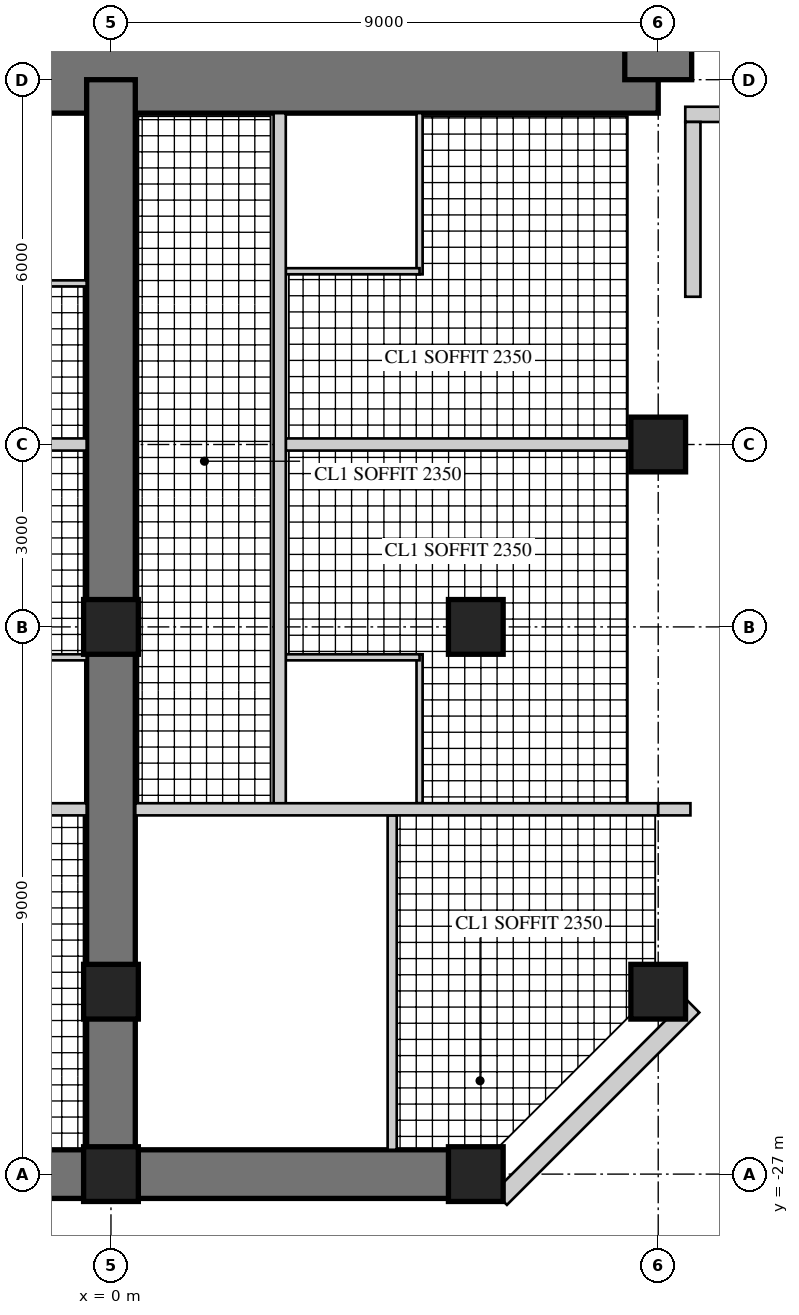
"""IFC4 building model, lengths in metres.
Left out: names, types, materials, properties, quantities, classifications, styles, units other than length and angle.
Written with IfcOpenShell. Run it as: python <this file> out.ifc"""

import sys

from ifc_helpers import new_model, si_unit, direction, frame, frame_2d, origin, origin_2d, place, context, subcontext, project, spatial, rectangle, hollow_rectangle, extrude, element, fill, save


model = new_model("IFC4")
c1 = context("Model", 3, precision=1e-05, world=origin(), true_north=direction((0.0, 1.0)))
c2 = subcontext(c1, "Body", "Model", "MODEL_VIEW")
j1 = project(units=[si_unit("LENGTHUNIT", "METRE"), si_unit("PLANEANGLEUNIT", "RADIAN")], contexts=[c1])
p1 = place(None, origin())
s1 = spatial("IfcSite", under=j1, at=p1, CompositionType="ELEMENT")
p2 = place(p1, origin())
s2 = spatial("IfcBuilding", under=s1, at=p2, CompositionType="ELEMENT")
p3 = place(p2, frame((0.0, 0.0, 172.9)))
s3 = spatial("IfcBuildingStorey", under=s2, at=p3, CompositionType="ELEMENT", Elevation=172.9)
p4 = place(p3, frame((-9.0, -9.0, 0.0), z_axis=(0.0, 0.0, 1.0), x_axis=(1.0, 0.0, 0.0)))
e1 = element("IfcWall", 1, at=p4, inside=s3, PredefinedType="SHEAR", context=c2, shape_type="SweptSolid", body=[
    extrude(rectangle(XDim=18.0, YDim=1.1, at=frame_2d((9.0, 0.0))), origin(), (0.0, 0.0, 1.0), 3.4),
])
p5 = place(p4, frame((9.8, 0.0, 0.0)))
e2 = element("IfcOpeningElement", 2, at=p5, cuts=e1, PredefinedType="OPENING", context=c2, shape_type="SweptSolid", body=[
    extrude(rectangle(XDim=1.0, YDim=2.4, at=frame_2d((0.5, 1.2))), frame((0.0, 0.56, 0.0), z_axis=(0.0, -1.0, 0.0), x_axis=(1.0, 0.0, 0.0)), (0.0, 0.0, 1.0), 1.12),
])
p6 = place(p3, frame((9.0, -9.0, 0.0), z_axis=(0.0, 0.0, 1.0), x_axis=(0.0, 1.0, 0.0)))
e3 = element("IfcWall", 3, at=p6, inside=s3, PredefinedType="SHEAR", context=c2, shape_type="SweptSolid", body=[
    extrude(rectangle(XDim=18.0, YDim=1.1, at=frame_2d((9.0, 0.0))), origin(), (0.0, 0.0, 1.0), 3.4),
])
p7 = place(p6, frame((9.8, 0.0, 0.0)))
e4 = element("IfcOpeningElement", 4, at=p7, cuts=e3, PredefinedType="OPENING", context=c2, shape_type="SweptSolid", body=[
    extrude(rectangle(XDim=1.0, YDim=2.4, at=frame_2d((0.5, 1.2))), frame((0.0, 0.56, 0.0), z_axis=(0.0, -1.0, 0.0), x_axis=(1.0, 0.0, 0.0)), (0.0, 0.0, 1.0), 1.12),
])
p8 = place(p3, frame((0.0, -9.0, 0.0), z_axis=(0.0, 0.0, 1.0), x_axis=(0.0, -1.0, 0.0)))
e5 = element("IfcWall", 5, at=p8, inside=s3, PredefinedType="SHEAR", context=c2, shape_type="SweptSolid", body=[
    extrude(rectangle(XDim=18.0, YDim=0.8, at=frame_2d((9.0, 0.0))), origin(), (0.0, 0.0, 1.0), 3.4),
])
p9 = place(p8, frame((3.95, 0.0, 0.0)))
e6 = element("IfcOpeningElement", 6, at=p9, cuts=e5, PredefinedType="OPENING", context=c2, shape_type="SweptSolid", body=[
    extrude(rectangle(XDim=1.0, YDim=2.15, at=frame_2d((0.5, 1.075))), frame((0.0, 0.41, 0.0), z_axis=(0.0, -1.0, 0.0), x_axis=(1.0, 0.0, 0.0)), (0.0, 0.0, 1.0), 0.82),
])
p10 = place(p8, frame((6.6, 0.0, 0.0)))
e7 = element("IfcOpeningElement", 7, at=p10, cuts=e5, PredefinedType="OPENING", context=c2, shape_type="SweptSolid", body=[
    extrude(rectangle(XDim=1.0, YDim=2.15, at=frame_2d((0.5, 1.075))), frame((0.0, 0.41, 0.0), z_axis=(0.0, -1.0, 0.0), x_axis=(1.0, 0.0, 0.0)), (0.0, 0.0, 1.0), 0.82),
])
p11 = place(p8, frame((13.25, 0.0, 0.0)))
e8 = element("IfcOpeningElement", 8, at=p11, cuts=e5, PredefinedType="OPENING", context=c2, shape_type="SweptSolid", body=[
    extrude(rectangle(XDim=1.0, YDim=2.2, at=frame_2d((0.5, 1.1))), frame((0.0, 0.41, 0.0), z_axis=(0.0, -1.0, 0.0), x_axis=(1.0, 0.0, 0.0)), (0.0, 0.0, 1.0), 0.82),
])
p12 = place(p3, frame((-6.0, -27.0, 0.0), z_axis=(0.0, 0.0, 1.0), x_axis=(1.0, 0.0, 0.0)))
e9 = element("IfcWall", 9, at=p12, inside=s3, PredefinedType="SHEAR", context=c2, shape_type="SweptSolid", body=[
    extrude(rectangle(XDim=12.0, YDim=0.8, at=frame_2d((6.0, 0.0))), origin(), (0.0, 0.0, 1.0), 3.4),
])
p13 = place(p12, frame((1.625, 0.0, 0.6)))
e10 = element("IfcOpeningElement", 10, at=p13, cuts=e9, PredefinedType="OPENING", context=c2, shape_type="SweptSolid", body=[
    extrude(rectangle(XDim=3.0, YDim=2.4, at=frame_2d((1.5, 1.2))), frame((0.0, 0.41, 0.0), z_axis=(0.0, -1.0, 0.0), x_axis=(1.0, 0.0, 0.0)), (0.0, 0.0, 1.0), 0.82),
])
p14 = place(p12, frame((7.375, 0.0, 0.6)))
e11 = element("IfcOpeningElement", 11, at=p14, cuts=e9, PredefinedType="OPENING", context=c2, shape_type="SweptSolid", body=[
    extrude(rectangle(XDim=3.0, YDim=2.4, at=frame_2d((1.5, 1.2))), frame((0.0, 0.41, 0.0), z_axis=(0.0, -1.0, 0.0), x_axis=(1.0, 0.0, 0.0)), (0.0, 0.0, 1.0), 0.82),
])
for number, where, z_axis, x_axis in (
    (12, (9.0, -15.0, 0.0), (0.0, 0.0, 1.0), (1.0, 0.0, 0.0)),
    (13, (9.0, -24.0, 0.0), (0.0, 0.0, 1.0), (1.0, 0.0, 0.0)),
    (14, (0.0, -27.0, 0.0), (0.0, 0.0, 1.0), (1.0, 0.0, 0.0)),
    (15, (6.0, -27.0, 0.0), (0.0, 0.0, 1.0), (1.0, 0.0, 0.0)),
    (16, (0.0, -18.0, 0.0), (0.0, 0.0, 1.0), (1.0, 0.0, 0.0)),
    (17, (6.0, -18.0, 0.0), (0.0, 0.0, 1.0), (1.0, 0.0, 0.0)),
    (18, (0.0, -24.0, 0.0), (0.0, 0.0, 1.0), (1.0, 0.0, 0.0)),
):
    element("IfcColumn", number, at=place(p3, frame(where, z_axis=z_axis, x_axis=x_axis)), inside=s3, PredefinedType="COLUMN", context=c2, shape_type="SweptSolid", body=[
        extrude(rectangle(XDim=0.9, YDim=0.9, at=origin_2d()), origin(), (0.0, 0.0, 1.0), 3.4),
    ])
p15 = place(p3, frame((9.445, -9.57, 0.0), z_axis=(0.0, 0.0, 1.0), x_axis=(1.0, 0.0, 0.0)))
e19 = element("IfcWall", 19, at=p15, inside=s3, PredefinedType="SOLIDWALL", context=c2, shape_type="SweptSolid", body=[
    extrude(rectangle(XDim=3.125, YDim=0.25, at=frame_2d((1.562, 0.0))), origin(), (0.0, 0.0, 1.0), 3.22),
])
p16 = place(p15, frame((0.6, 0.0, 0.0)))
e20 = element("IfcOpeningElement", 20, at=p16, cuts=e19, PredefinedType="OPENING", context=c2, shape_type="SweptSolid", body=[
    extrude(rectangle(XDim=1.0, YDim=2.2, at=frame_2d((0.5, 1.1))), frame((0.0, 0.135, 0.0), z_axis=(0.0, -1.0, 0.0), x_axis=(1.0, 0.0, 0.0)), (0.0, 0.0, 1.0), 0.27),
])
p17 = place(p3, frame((6.406, -27.4, 0.0), z_axis=(0.0, 0.0, 1.0), x_axis=(0.707134062067, 0.707079499254, 0.0)))
e21 = element("IfcWall", 21, at=p17, inside=s3, PredefinedType="SOLIDWALL", context=c2, shape_type="SweptSolid", body=[
    extrude(rectangle(XDim=4.475, YDim=0.3, at=frame_2d((2.237, 0.0))), origin(), (0.0, 0.0, 1.0), 3.22),
])
p18 = place(p17, frame((1.787, 0.0, 0.3)))
e22 = element("IfcOpeningElement", 22, at=p18, cuts=e21, PredefinedType="OPENING", context=c2, shape_type="SweptSolid", body=[
    extrude(rectangle(XDim=0.9, YDim=2.4, at=frame_2d((0.45, 1.2))), frame((0.0, 0.16, 0.0), z_axis=(0.0, -1.0, 0.0), x_axis=(1.0, 0.0, 0.0)), (0.0, 0.0, 1.0), 0.32),
])
p19 = place(p3, frame((9.57, -12.57, 0.0), z_axis=(0.0, 0.0, 1.0), x_axis=(0.0, 1.0, 0.0)))
e23 = element("IfcWall", 23, at=p19, inside=s3, PredefinedType="SOLIDWALL", context=c2, shape_type="SweptSolid", body=[
    extrude(rectangle(XDim=2.875, YDim=0.25, at=frame_2d((1.438, 0.0))), origin(), (0.0, 0.0, 1.0), 3.22),
])
p20 = place(p19, frame((0.6, 0.0, 0.0)))
e24 = element("IfcOpeningElement", 24, at=p20, cuts=e23, PredefinedType="OPENING", context=c2, shape_type="SweptSolid", body=[
    extrude(rectangle(XDim=1.0, YDim=2.2, at=frame_2d((0.5, 1.1))), frame((0.0, 0.135, 0.0), z_axis=(0.0, -1.0, 0.0), x_axis=(1.0, 0.0, 0.0)), (0.0, 0.0, 1.0), 0.27),
])
p21 = place(p3, frame((5.075, -9.55, 0.0), z_axis=(0.0, 0.0, 1.0), x_axis=(0.0, -1.0, 0.0)))
e25 = element("IfcWall", 25, at=p21, inside=s3, PredefinedType="PARTITIONING", context=c2, shape_type="SweptSolid", body=[
    extrude(rectangle(XDim=2.65, YDim=0.1, at=frame_2d((1.325, 0.0))), origin(), (0.0, 0.0, 1.0), 3.22),
])
p22 = place(p3, frame((2.875, -12.15, 0.0), z_axis=(0.0, 0.0, 1.0), x_axis=(1.0, 0.0, 0.0)))
e26 = element("IfcWall", 26, at=p22, inside=s3, PredefinedType="PARTITIONING", context=c2, shape_type="SweptSolid", body=[
    extrude(rectangle(XDim=2.2, YDim=0.1, at=frame_2d((1.1, 0.0))), origin(), (0.0, 0.0, 1.0), 3.22),
])
p23 = place(p22, frame((0.55, 0.0, 0.0)))
e27 = element("IfcOpeningElement", 27, at=p23, cuts=e26, PredefinedType="OPENING", context=c2, shape_type="SweptSolid", body=[
    extrude(rectangle(XDim=0.9, YDim=2.1, at=frame_2d((0.45, 1.05))), frame((0.0, 0.06, 0.0), z_axis=(0.0, -1.0, 0.0), x_axis=(1.0, 0.0, 0.0)), (0.0, 0.0, 1.0), 0.12),
])
p24 = place(p3, frame((-3.0, -12.35, 0.0), z_axis=(0.0, 0.0, 1.0), x_axis=(1.0, 0.0, 0.0)))
e28 = element("IfcWall", 28, at=p24, inside=s3, PredefinedType="PARTITIONING", context=c2, shape_type="SweptSolid", body=[
    extrude(rectangle(XDim=2.6, YDim=0.1, at=frame_2d((1.3, 0.0))), origin(), (0.0, 0.0, 1.0), 3.22),
])
p25 = place(p24, frame((0.55, 0.0, 0.0)))
e29 = element("IfcOpeningElement", 29, at=p25, cuts=e28, PredefinedType="OPENING", context=c2, shape_type="SweptSolid", body=[
    extrude(rectangle(XDim=0.9, YDim=2.1, at=frame_2d((0.45, 1.05))), frame((0.0, 0.06, 0.0), z_axis=(0.0, -1.0, 0.0), x_axis=(1.0, 0.0, 0.0)), (0.0, 0.0, 1.0), 0.12),
])
p26 = place(p3, frame((2.875, -15.0, 0.0), z_axis=(0.0, 0.0, 1.0), x_axis=(1.0, 0.0, 0.0)))
e30 = element("IfcWall", 30, at=p26, inside=s3, PredefinedType="SOLIDWALL", context=c2, shape_type="SweptSolid", body=[
    extrude(rectangle(XDim=5.675, YDim=0.2, at=frame_2d((2.837, 0.0))), origin(), (0.0, 0.0, 1.0), 2.47),
])
p27 = place(p3, frame((-8.55, -15.0, 0.0), z_axis=(0.0, 0.0, 1.0), x_axis=(1.0, 0.0, 0.0)))
e31 = element("IfcWall", 31, at=p27, inside=s3, PredefinedType="SOLIDWALL", context=c2, shape_type="SweptSolid", body=[
    extrude(rectangle(XDim=8.15, YDim=0.2, at=frame_2d((4.075, 0.0))), origin(), (0.0, 0.0, 1.0), 2.47),
])
p28 = place(p3, frame((5.075, -18.45, 0.0), z_axis=(0.0, 0.0, 1.0), x_axis=(0.0, -1.0, 0.0)))
e32 = element("IfcWall", 32, at=p28, inside=s3, PredefinedType="PARTITIONING", context=c2, shape_type="SweptSolid", body=[
    extrude(rectangle(XDim=2.45, YDim=0.1, at=frame_2d((1.225, 0.0))), origin(), (0.0, 0.0, 1.0), 3.22),
])
p29 = place(p3, frame((2.875, -18.5, 0.0), z_axis=(0.0, 0.0, 1.0), x_axis=(1.0, 0.0, 0.0)))
e33 = element("IfcWall", 33, at=p29, inside=s3, PredefinedType="PARTITIONING", context=c2, shape_type="SweptSolid", body=[
    extrude(rectangle(XDim=2.2, YDim=0.1, at=frame_2d((1.1, 0.0))), origin(), (0.0, 0.0, 1.0), 3.22),
])
p30 = place(p29, frame((0.55, 0.0, 0.0)))
e34 = element("IfcOpeningElement", 34, at=p30, cuts=e33, PredefinedType="OPENING", context=c2, shape_type="SweptSolid", body=[
    extrude(rectangle(XDim=0.9, YDim=2.1, at=frame_2d((0.45, 1.05))), frame((0.0, 0.06, 0.0), z_axis=(0.0, -1.0, 0.0), x_axis=(1.0, 0.0, 0.0)), (0.0, 0.0, 1.0), 0.12),
])
p31 = place(p3, frame((-2.6, -18.5, 0.0), z_axis=(0.0, 0.0, 1.0), x_axis=(1.0, 0.0, 0.0)))
e35 = element("IfcWall", 35, at=p31, inside=s3, PredefinedType="PARTITIONING", context=c2, shape_type="SweptSolid", body=[
    extrude(rectangle(XDim=2.2, YDim=0.1, at=frame_2d((1.1, 0.0))), origin(), (0.0, 0.0, 1.0), 3.22),
])
p32 = place(p31, frame((0.55, 0.0, 0.0)))
e36 = element("IfcOpeningElement", 36, at=p32, cuts=e35, PredefinedType="OPENING", context=c2, shape_type="SweptSolid", body=[
    extrude(rectangle(XDim=0.9, YDim=2.1, at=frame_2d((0.45, 1.05))), frame((0.0, 0.06, 0.0), z_axis=(0.0, -1.0, 0.0), x_axis=(1.0, 0.0, 0.0)), (0.0, 0.0, 1.0), 0.12),
])
p33 = place(p3, frame((2.775, -9.55, 0.0), z_axis=(0.0, 0.0, 1.0), x_axis=(0.0, -1.0, 0.0)))
e37 = element("IfcWall", 37, at=p33, inside=s3, PredefinedType="SOLIDWALL", context=c2, shape_type="SweptSolid", body=[
    extrude(rectangle(XDim=11.45, YDim=0.2, at=frame_2d((5.725, 0.0))), origin(), (0.0, 0.0, 1.0), 3.22),
])
p34 = place(p33, frame((3.4, 0.0, 0.0)))
e38 = element("IfcOpeningElement", 38, at=p34, cuts=e37, PredefinedType="OPENING", context=c2, shape_type="SweptSolid", body=[
    extrude(rectangle(XDim=1.0, YDim=2.15, at=frame_2d((0.5, 1.075))), frame((0.0, 0.11, 0.0), z_axis=(0.0, -1.0, 0.0), x_axis=(1.0, 0.0, 0.0)), (0.0, 0.0, 1.0), 0.22),
])
p35 = place(p33, frame((6.05, 0.0, 0.0)))
e39 = element("IfcOpeningElement", 39, at=p35, cuts=e37, PredefinedType="OPENING", context=c2, shape_type="SweptSolid", body=[
    extrude(rectangle(XDim=1.0, YDim=2.15, at=frame_2d((0.5, 1.075))), frame((0.0, 0.11, 0.0), z_axis=(0.0, -1.0, 0.0), x_axis=(1.0, 0.0, 0.0)), (0.0, 0.0, 1.0), 0.22),
])
p36 = place(p3, frame((4.625, -21.1, 0.0), z_axis=(0.0, 0.0, 1.0), x_axis=(0.0, -1.0, 0.0)))
e40 = element("IfcWall", 40, at=p36, inside=s3, PredefinedType="PARTITIONING", context=c2, shape_type="SweptSolid", body=[
    extrude(rectangle(XDim=5.5, YDim=0.15, at=frame_2d((2.75, 0.0))), origin(), (0.0, 0.0, 1.0), 3.22),
])
p37 = place(p36, frame((0.6, 0.0, 0.0)))
e41 = element("IfcOpeningElement", 41, at=p37, cuts=e40, PredefinedType="OPENING", context=c2, shape_type="SweptSolid", body=[
    extrude(rectangle(XDim=1.0, YDim=2.1, at=frame_2d((0.5, 1.05))), frame((0.0, 0.085, 0.0), z_axis=(0.0, -1.0, 0.0), x_axis=(1.0, 0.0, 0.0)), (0.0, 0.0, 1.0), 0.17),
])
p38 = place(p3, frame((-9.0, -21.0, 0.0), z_axis=(0.0, 0.0, 1.0), x_axis=(1.0, 0.0, 0.0)))
e42 = element("IfcWall", 42, at=p38, inside=s3, PredefinedType="SOLIDWALL", context=c2, shape_type="SweptSolid", body=[
    extrude(rectangle(XDim=8.6, YDim=0.2, at=frame_2d((4.3, 0.0))), origin(), (0.0, 0.0, 1.0), 2.62),
])
p39 = place(p3, frame((0.4, -21.0, 0.0), z_axis=(0.0, 0.0, 1.0), x_axis=(1.0, 0.0, 0.0)))
e43 = element("IfcWall", 43, at=p39, inside=s3, PredefinedType="SOLIDWALL", context=c2, shape_type="SweptSolid", body=[
    extrude(rectangle(XDim=8.6, YDim=0.2, at=frame_2d((4.3, 0.0))), origin(), (0.0, 0.0, 1.0), 2.62),
])
p40 = place(p39, frame((0.4, 0.0, 0.0)))
e44 = element("IfcOpeningElement", 44, at=p40, cuts=e43, PredefinedType="OPENING", context=c2, shape_type="SweptSolid", body=[
    extrude(rectangle(XDim=1.0, YDim=2.2, at=frame_2d((0.5, 1.1))), frame((0.0, 0.11, 0.0), z_axis=(0.0, -1.0, 0.0), x_axis=(1.0, 0.0, 0.0)), (0.0, 0.0, 1.0), 0.22),
])
p41 = place(p3, frame((9.0, -21.0, 0.0), z_axis=(0.0, 0.0, 1.0), x_axis=(1.0, 0.0, 0.0)))
e45 = element("IfcWall", 45, at=p41, inside=s3, PredefinedType="SOLIDWALL", context=c2, shape_type="SweptSolid", body=[
    extrude(rectangle(XDim=0.53, YDim=0.2, at=frame_2d((0.265, 0.0))), origin(), (0.0, 0.0, 1.0), 3.22),
])
p42 = place(p14, origin())
e46 = element("IfcWindow", 46, at=p42, inside=s3, PartitioningType="SINGLE_PANEL", PredefinedType="WINDOW", context=c2, shape_type="SweptSolid", body=[
    extrude(hollow_rectangle(XDim=3.0, YDim=2.4, WallThickness=0.06, at=frame_2d((1.5, 1.2))), frame((0.0, 0.03, 0.0), z_axis=(0.0, -1.0, 0.0), x_axis=(1.0, 0.0, 0.0)), (0.0, 0.0, 1.0), 0.06),
    extrude(rectangle(XDim=2.879, YDim=2.279, at=frame_2d((1.5, 1.2))), frame((0.0, 0.03, 0.0), z_axis=(0.0, -1.0, 0.0), x_axis=(1.0, 0.0, 0.0)), (0.0, 0.0, 1.0), 0.06),
])
fill(e11, e46)
p43 = place(p18, origin())
e47 = element("IfcWindow", 47, at=p43, inside=s3, PartitioningType="SINGLE_PANEL", PredefinedType="WINDOW", context=c2, shape_type="SweptSolid", body=[
    extrude(hollow_rectangle(XDim=0.9, YDim=2.4, WallThickness=0.06, at=frame_2d((0.45, 1.2))), frame((0.0, 0.03, 0.0), z_axis=(0.0, -1.0, 0.0), x_axis=(1.0, 0.0, 0.0)), (0.0, 0.0, 1.0), 0.06),
    extrude(rectangle(XDim=0.779, YDim=2.279, at=frame_2d((0.45, 1.2))), frame((0.0, 0.03, 0.0), z_axis=(0.0, -1.0, 0.0), x_axis=(1.0, 0.0, 0.0)), (0.0, 0.0, 1.0), 0.06),
])
fill(e22, e47)
p44 = place(p20, origin())
e48 = element("IfcDoor", 48, at=p44, inside=s3, OperationType="SINGLE_SWING_RIGHT", PredefinedType="DOOR", context=c2, shape_type="SweptSolid", body=[
    extrude(hollow_rectangle(XDim=1.0, YDim=2.2, WallThickness=0.06, at=frame_2d((0.5, 1.1))), frame((0.0, 0.025, 0.0), z_axis=(0.0, -1.0, 0.0), x_axis=(1.0, 0.0, 0.0)), (0.0, 0.0, 1.0), 0.05),
    extrude(rectangle(XDim=0.879, YDim=2.079, at=frame_2d((0.5, 1.1))), frame((0.0, 0.025, 0.0), z_axis=(0.0, -1.0, 0.0), x_axis=(1.0, 0.0, 0.0)), (0.0, 0.0, 1.0), 0.05),
])
fill(e24, e48)
p45 = place(p23, origin())
e49 = element("IfcDoor", 49, at=p45, inside=s3, OperationType="SINGLE_SWING_LEFT", PredefinedType="DOOR", context=c2, shape_type="SweptSolid", body=[
    extrude(rectangle(XDim=0.9, YDim=2.1, at=frame_2d((0.45, 1.05))), frame((0.0, 0.025, 0.0), z_axis=(0.0, -1.0, 0.0), x_axis=(1.0, 0.0, 0.0)), (0.0, 0.0, 1.0), 0.05),
])
fill(e27, e49)
p46 = place(p30, frame((0.9, 0.0, 0.0), z_axis=(0.0, 0.0, 1.0), x_axis=(-1.0, 0.0, 0.0)))
e50 = element("IfcDoor", 50, at=p46, inside=s3, OperationType="SINGLE_SWING_RIGHT", PredefinedType="DOOR", context=c2, shape_type="SweptSolid", body=[
    extrude(rectangle(XDim=0.9, YDim=2.1, at=frame_2d((0.45, 1.05))), frame((0.0, 0.025, 0.0), z_axis=(0.0, -1.0, 0.0), x_axis=(1.0, 0.0, 0.0)), (0.0, 0.0, 1.0), 0.05),
])
fill(e34, e50)
p47 = place(p34, origin())
e51 = element("IfcDoor", 51, at=p47, inside=s3, OperationType="SINGLE_SWING_LEFT", PredefinedType="DOOR", context=c2, shape_type="SweptSolid", body=[
    extrude(rectangle(XDim=1.0, YDim=2.15, at=frame_2d((0.5, 1.075))), frame((0.0, 0.025, 0.0), z_axis=(0.0, -1.0, 0.0), x_axis=(1.0, 0.0, 0.0)), (0.0, 0.0, 1.0), 0.05),
])
fill(e38, e51)
p48 = place(p35, origin())
e52 = element("IfcDoor", 52, at=p48, inside=s3, OperationType="SINGLE_SWING_LEFT", PredefinedType="DOOR", context=c2, shape_type="SweptSolid", body=[
    extrude(rectangle(XDim=1.0, YDim=2.15, at=frame_2d((0.5, 1.075))), frame((0.0, 0.025, 0.0), z_axis=(0.0, -1.0, 0.0), x_axis=(1.0, 0.0, 0.0)), (0.0, 0.0, 1.0), 0.05),
])
fill(e39, e52)
p49 = place(p37, origin())
e53 = element("IfcDoor", 53, at=p49, inside=s3, OperationType="SINGLE_SWING_LEFT", PredefinedType="DOOR", context=c2, shape_type="SweptSolid", body=[
    extrude(rectangle(XDim=1.0, YDim=2.1, at=frame_2d((0.5, 1.05))), frame((0.0, 0.025, 0.0), z_axis=(0.0, -1.0, 0.0), x_axis=(1.0, 0.0, 0.0)), (0.0, 0.0, 1.0), 0.05),
])
fill(e41, e53)
p50 = place(p40, frame((1.0, 0.0, 0.0), z_axis=(0.0, 0.0, 1.0), x_axis=(-1.0, 0.0, 0.0)))
e54 = element("IfcDoor", 54, at=p50, inside=s3, OperationType="SINGLE_SWING_RIGHT", PredefinedType="DOOR", context=c2, shape_type="SweptSolid", body=[
    extrude(rectangle(XDim=1.0, YDim=2.2, at=frame_2d((0.5, 1.1))), frame((0.0, 0.025, 0.0), z_axis=(0.0, -1.0, 0.0), x_axis=(1.0, 0.0, 0.0)), (0.0, 0.0, 1.0), 0.05),
])
fill(e44, e54)
p51 = place(p9, frame((1.0, 0.0, 0.0), z_axis=(0.0, 0.0, 1.0), x_axis=(-1.0, 0.0, 0.0)))
e55 = element("IfcDoor", 55, at=p51, inside=s3, OperationType="SINGLE_SWING_RIGHT", PredefinedType="DOOR", context=c2, shape_type="SweptSolid", body=[
    extrude(rectangle(XDim=1.0, YDim=2.15, at=frame_2d((0.5, 1.075))), frame((0.0, 0.025, 0.0), z_axis=(0.0, -1.0, 0.0), x_axis=(1.0, 0.0, 0.0)), (0.0, 0.0, 1.0), 0.05),
])
fill(e6, e55)
p52 = place(p10, frame((1.0, 0.0, 0.0), z_axis=(0.0, 0.0, 1.0), x_axis=(-1.0, 0.0, 0.0)))
e56 = element("IfcDoor", 56, at=p52, inside=s3, OperationType="SINGLE_SWING_RIGHT", PredefinedType="DOOR", context=c2, shape_type="SweptSolid", body=[
    extrude(rectangle(XDim=1.0, YDim=2.15, at=frame_2d((0.5, 1.075))), frame((0.0, 0.025, 0.0), z_axis=(0.0, -1.0, 0.0), x_axis=(1.0, 0.0, 0.0)), (0.0, 0.0, 1.0), 0.05),
])
fill(e7, e56)
p53 = place(p11, origin())
e57 = element("IfcDoor", 57, at=p53, inside=s3, OperationType="SINGLE_SWING_LEFT", PredefinedType="DOOR", context=c2, shape_type="SweptSolid", body=[
    extrude(rectangle(XDim=1.0, YDim=2.2, at=frame_2d((0.5, 1.1))), frame((0.0, 0.025, 0.0), z_axis=(0.0, -1.0, 0.0), x_axis=(1.0, 0.0, 0.0)), (0.0, 0.0, 1.0), 0.05),
])
fill(e8, e57)
p54 = place(p5, origin())
e58 = element("IfcDoor", 58, at=p54, inside=s3, OperationType="SINGLE_SWING_RIGHT", PredefinedType="DOOR", context=c2, shape_type="SweptSolid", body=[
    extrude(rectangle(XDim=1.0, YDim=2.4, at=frame_2d((0.5, 1.2))), frame((0.0, 0.055, 0.0), z_axis=(0.0, -1.0, 0.0), x_axis=(1.0, 0.0, 0.0)), (0.0, 0.0, 1.0), 0.05),
])
fill(e2, e58)
save(model, sys.argv[1])
